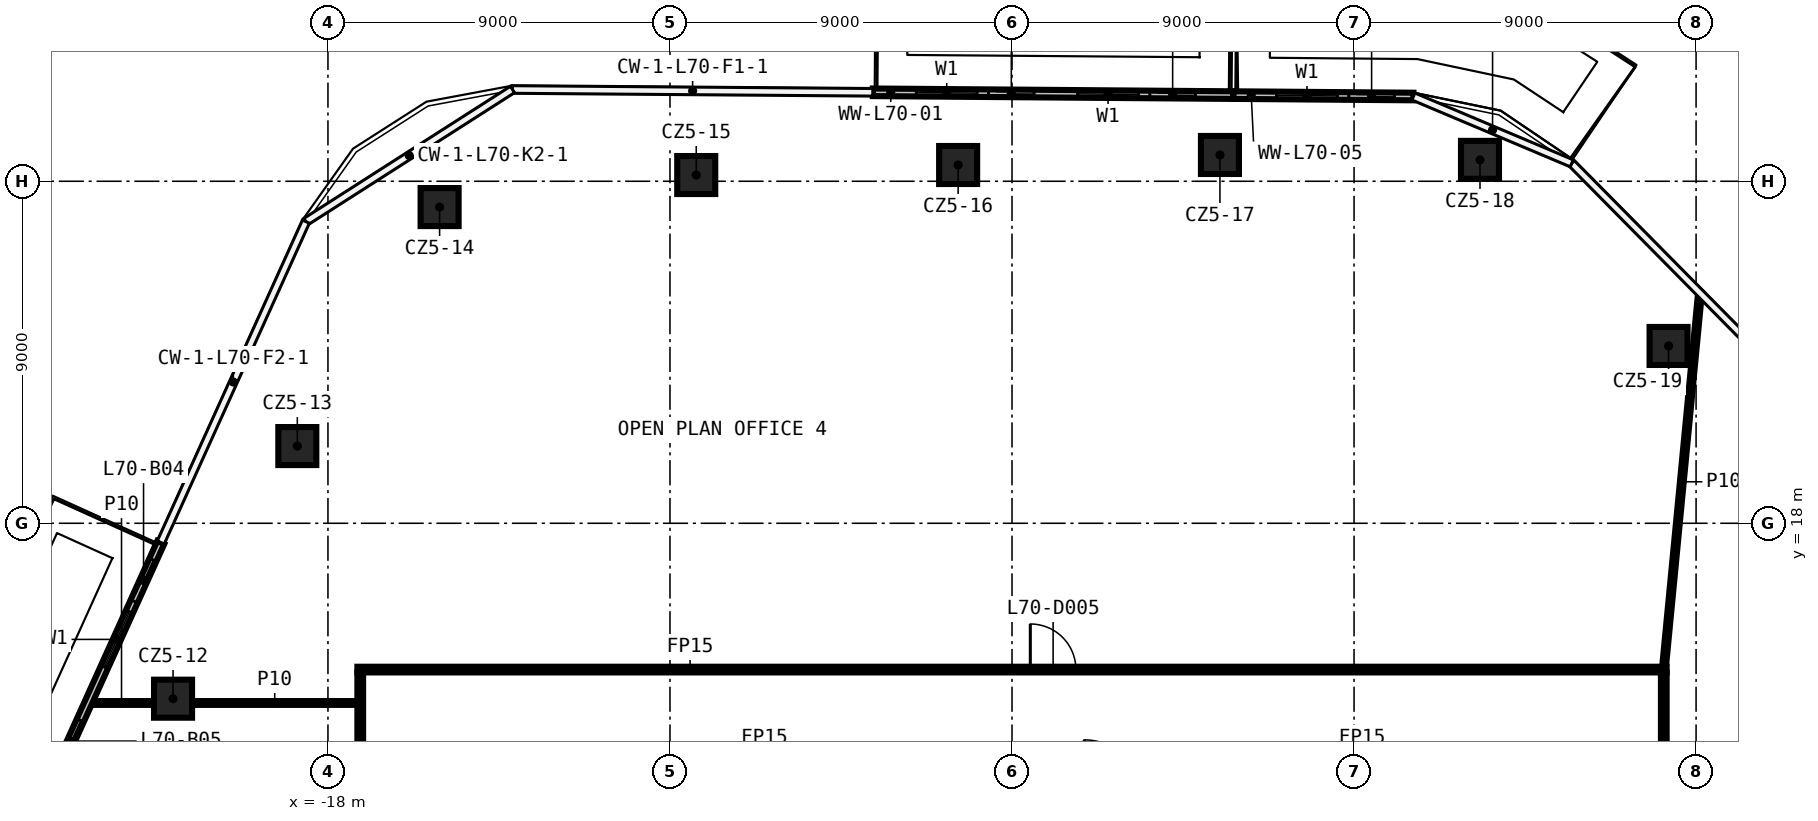
"""IFC4 building model, lengths in metres.
Left out: names, types, materials, properties, quantities, classifications, styles, units other than length and angle.
Written with IfcOpenShell. Run it as: python <this file> out.ifc"""

import sys

from ifc_helpers import new_model, si_unit, direction, frame, frame_2d, origin, origin_2d, place, context, subcontext, project, spatial, rectangle, extrude, element, fill, save


model = new_model("IFC4")
c1 = context("Model", 3, precision=1e-05, world=origin(), true_north=direction((0.0, 1.0)))
c2 = subcontext(c1, "Body", "Model", "MODEL_VIEW")
j1 = project(units=[si_unit("LENGTHUNIT", "METRE"), si_unit("PLANEANGLEUNIT", "RADIAN")], contexts=[c1])
p1 = place(None, origin())
s1 = spatial("IfcSite", under=j1, at=p1, CompositionType="ELEMENT")
p2 = place(p1, origin())
s2 = spatial("IfcBuilding", under=s1, at=p2, CompositionType="ELEMENT")
p3 = place(p2, frame((0.0, 0.0, 327.8)))
s3 = spatial("IfcBuildingStorey", under=s2, at=p3, CompositionType="ELEMENT", Elevation=327.8)
for number, where, z_axis, x_axis in (
    (1, (-22.076, 13.384, 0.0), (0.0, 0.0, 1.0), (1.0, 0.0, 0.0)),
    (2, (-18.806, 20.032, 0.0), (0.0, 0.0, 1.0), (1.0, 0.0, 0.0)),
    (3, (-15.062, 26.321, 0.0), (0.0, 0.0, 1.0), (1.0, 0.0, 0.0)),
    (4, (-8.309, 27.164, 0.0), (0.0, 0.0, 1.0), (1.0, 0.0, 0.0)),
    (5, (-1.418, 27.428, 0.0), (0.0, 0.0, 1.0), (1.0, 0.0, 0.0)),
    (6, (5.471, 27.692, 0.0), (0.0, 0.0, 1.0), (1.0, 0.0, 0.0)),
    (7, (12.314, 27.563, 0.0), (0.0, 0.0, 1.0), (1.0, 0.0, 0.0)),
    (8, (17.276, 22.666, 0.0), (0.0, 0.0, 1.0), (1.0, 0.0, 0.0)),
):
    element("IfcColumn", number, at=place(p3, frame(where, z_axis=z_axis, x_axis=x_axis)), inside=s3, PredefinedType="COLUMN", context=c2, shape_type="SweptSolid", body=[
        extrude(rectangle(XDim=1.0, YDim=1.0, at=origin_2d()), origin(), (0.0, 0.0, 1.0), 3.82),
    ])
p4 = place(p3, frame((-24.288, 13.271, 0.0), z_axis=(0.0, 0.0, 1.0), x_axis=(1.0, 0.0, 0.0)))
e9 = element("IfcWall", 9, at=p4, inside=s3, PredefinedType="PARTITIONING", context=c2, shape_type="SweptSolid", body=[
    extrude(rectangle(XDim=1.712, YDim=0.1, at=frame_2d((0.856, 0.0))), origin(), (0.0, 0.0, 1.0), 3.82),
])
p5 = place(p3, frame((-21.576, 13.271, 0.0), z_axis=(0.0, 0.0, 1.0), x_axis=(1.0, 0.0, 0.0)))
e10 = element("IfcWall", 10, at=p5, inside=s3, PredefinedType="PARTITIONING", context=c2, shape_type="SweptSolid", body=[
    extrude(rectangle(XDim=4.351, YDim=0.1, at=frame_2d((2.175, 0.0))), origin(), (0.0, 0.0, 1.0), 3.82),
])
p6 = place(p3, frame((-17.225, 14.15, 0.0), z_axis=(0.0, 0.0, 1.0), x_axis=(1.0, 0.0, 0.0)))
e11 = element("IfcWall", 11, at=p6, inside=s3, PredefinedType="PARTITIONING", context=c2, shape_type="SweptSolid", body=[
    extrude(rectangle(XDim=34.45, YDim=0.15, at=frame_2d((17.225, 0.0))), origin(), (0.0, 0.0, 1.0), 3.82),
])
p7 = place(p6, frame((17.706, 0.0, 0.0)))
e12 = element("IfcOpeningElement", 12, at=p7, cuts=e11, PredefinedType="OPENING", context=c2, shape_type="SweptSolid", body=[
    extrude(rectangle(XDim=1.2, YDim=2.1, at=frame_2d((0.6, 1.05))), frame((0.0, 0.085, 0.0), z_axis=(0.0, -1.0, 0.0), x_axis=(1.0, 0.0, 0.0)), (0.0, 0.0, 1.0), 0.17),
])
p8 = place(p3, frame((17.15, 14.15, 0.0), z_axis=(0.0, 0.0, 1.0), x_axis=(0.095686172631, 0.995411551253, 0.0)))
e13 = element("IfcWall", 13, at=p8, inside=s3, PredefinedType="PARTITIONING", context=c2, shape_type="SweptSolid", body=[
    extrude(rectangle(XDim=9.93, YDim=0.1, at=frame_2d((4.965, 0.0))), origin(), (0.0, 0.0, 1.0), 3.82),
])
p9 = place(p3, frame((17.15, 14.075, 0.0), z_axis=(0.0, 0.0, 1.0), x_axis=(0.0, -1.0, 0.0)))
e14 = element("IfcWall", 14, at=p9, inside=s3, PredefinedType="PARTITIONING", context=c2, shape_type="SweptSolid", body=[
    extrude(rectangle(XDim=28.15, YDim=0.15, at=frame_2d((14.075, 0.0))), origin(), (0.0, 0.0, 1.0), 3.82),
])
p10 = place(p9, frame((18.186, 0.0, 0.0)))
e15 = element("IfcOpeningElement", 15, at=p10, cuts=e14, PredefinedType="OPENING", context=c2, shape_type="SweptSolid", body=[
    extrude(rectangle(XDim=1.2, YDim=2.1, at=frame_2d((0.6, 1.05))), frame((0.0, 0.085, 0.0), z_axis=(0.0, -1.0, 0.0), x_axis=(1.0, 0.0, 0.0)), (0.0, 0.0, 1.0), 0.17),
])
p11 = place(p3, frame((-17.15, -14.075, 0.0), z_axis=(0.0, 0.0, 1.0), x_axis=(0.0, 1.0, 0.0)))
e16 = element("IfcWall", 16, at=p11, inside=s3, PredefinedType="PARTITIONING", context=c2, shape_type="SweptSolid", body=[
    extrude(rectangle(XDim=28.15, YDim=0.15, at=frame_2d((14.075, 0.0))), origin(), (0.0, 0.0, 1.0), 3.82),
])
p12 = place(p11, frame((18.298, 0.0, 0.0)))
e17 = element("IfcOpeningElement", 17, at=p12, cuts=e16, PredefinedType="OPENING", context=c2, shape_type="SweptSolid", body=[
    extrude(rectangle(XDim=1.2, YDim=2.1, at=frame_2d((0.6, 1.05))), frame((0.0, 0.085, 0.0), z_axis=(0.0, -1.0, 0.0), x_axis=(1.0, 0.0, 0.0)), (0.0, 0.0, 1.0), 0.17),
])
p13 = place(p3, frame((5.827, 29.267, 0.0), z_axis=(0.0, 0.0, 1.0), x_axis=(-0.999969823552, 0.007768653994, 0.0)))
e18 = element("IfcWall", 18, at=p13, inside=s3, PredefinedType="SOLIDWALL", context=c2, shape_type="SweptSolid", body=[
    extrude(rectangle(XDim=9.491, YDim=0.2, at=frame_2d((4.745, 0.0))), origin(), (0.0, 0.0, 1.0), 3.82),
])
p14 = place(p13, frame((2.5, 0.0, 0.6)))
e19 = element("IfcOpeningElement", 19, at=p14, cuts=e18, PredefinedType="OPENING", context=c2, shape_type="SweptSolid", body=[
    extrude(rectangle(XDim=1.6, YDim=2.4, at=frame_2d((0.8, 1.2))), frame((0.0, 0.11, 0.0), z_axis=(0.0, -1.0, 0.0), x_axis=(1.0, 0.0, 0.0)), (0.0, 0.0, 1.0), 0.22),
])
p15 = place(p13, frame((1.0, 0.0, 0.0)))
e20 = element("IfcOpeningElement", 20, at=p15, cuts=e18, PredefinedType="OPENING", context=c2, shape_type="SweptSolid", body=[
    extrude(rectangle(XDim=1.2, YDim=2.4, at=frame_2d((0.6, 1.2))), frame((0.0, 0.11, 0.0), z_axis=(0.0, -1.0, 0.0), x_axis=(1.0, 0.0, 0.0)), (0.0, 0.0, 1.0), 0.22),
])
p16 = place(p13, frame((6.745, 0.0, 0.6)))
e21 = element("IfcOpeningElement", 21, at=p16, cuts=e18, PredefinedType="OPENING", context=c2, shape_type="SweptSolid", body=[
    extrude(rectangle(XDim=1.6, YDim=2.4, at=frame_2d((0.8, 1.2))), frame((0.0, 0.11, 0.0), z_axis=(0.0, -1.0, 0.0), x_axis=(1.0, 0.0, 0.0)), (0.0, 0.0, 1.0), 0.22),
])
p17 = place(p13, frame((5.245, 0.0, 0.0)))
e22 = element("IfcOpeningElement", 22, at=p17, cuts=e18, PredefinedType="OPENING", context=c2, shape_type="SweptSolid", body=[
    extrude(rectangle(XDim=1.2, YDim=2.4, at=frame_2d((0.6, 1.2))), frame((0.0, 0.11, 0.0), z_axis=(0.0, -1.0, 0.0), x_axis=(1.0, 0.0, 0.0)), (0.0, 0.0, 1.0), 0.22),
])
p18 = place(p3, frame((10.562, 29.23, 0.0), z_axis=(0.0, 0.0, 1.0), x_axis=(-0.999969697406, 0.007784874423, 0.0)))
e23 = element("IfcWall", 23, at=p18, inside=s3, PredefinedType="SOLIDWALL", context=c2, shape_type="SweptSolid", body=[
    extrude(rectangle(XDim=4.736, YDim=0.2, at=frame_2d((2.368, 0.0))), origin(), (0.0, 0.0, 1.0), 3.82),
])
p19 = place(p18, frame((2.0, 0.0, 0.6)))
e24 = element("IfcOpeningElement", 24, at=p19, cuts=e23, PredefinedType="OPENING", context=c2, shape_type="SweptSolid", body=[
    extrude(rectangle(XDim=1.6, YDim=2.4, at=frame_2d((0.8, 1.2))), frame((0.0, 0.11, 0.0), z_axis=(0.0, -1.0, 0.0), x_axis=(1.0, 0.0, 0.0)), (0.0, 0.0, 1.0), 0.22),
])
p20 = place(p18, frame((0.5, 0.0, 0.0)))
e25 = element("IfcOpeningElement", 25, at=p20, cuts=e23, PredefinedType="OPENING", context=c2, shape_type="SweptSolid", body=[
    extrude(rectangle(XDim=1.2, YDim=2.4, at=frame_2d((0.6, 1.2))), frame((0.0, 0.11, 0.0), z_axis=(0.0, -1.0, 0.0), x_axis=(1.0, 0.0, 0.0)), (0.0, 0.0, 1.0), 0.22),
])
p21 = place(p3, frame((-22.399, 17.495, 0.0), z_axis=(0.0, 0.0, 1.0), x_axis=(-0.412123946496, -0.911127791654, 0.0)))
e26 = element("IfcWall", 26, at=p21, inside=s3, PredefinedType="SOLIDWALL", context=c2, shape_type="SweptSolid", body=[
    extrude(rectangle(XDim=23.18, YDim=0.2, at=frame_2d((11.59, 0.0))), origin(), (0.0, 0.0, 1.0), 3.82),
])
p22 = place(p21, frame((2.0, 0.0, 0.6)))
e27 = element("IfcOpeningElement", 27, at=p22, cuts=e26, PredefinedType="OPENING", context=c2, shape_type="SweptSolid", body=[
    extrude(rectangle(XDim=1.6, YDim=2.4, at=frame_2d((0.8, 1.2))), frame((0.0, 0.11, 0.0), z_axis=(0.0, -1.0, 0.0), x_axis=(1.0, 0.0, 0.0)), (0.0, 0.0, 1.0), 0.22),
])
p23 = place(p21, frame((0.5, 0.0, 0.0)))
e28 = element("IfcOpeningElement", 28, at=p23, cuts=e26, PredefinedType="OPENING", context=c2, shape_type="SweptSolid", body=[
    extrude(rectangle(XDim=1.2, YDim=2.4, at=frame_2d((0.6, 1.2))), frame((0.0, 0.11, 0.0), z_axis=(0.0, -1.0, 0.0), x_axis=(1.0, 0.0, 0.0)), (0.0, 0.0, 1.0), 0.22),
])
p24 = place(p21, frame((6.636, 0.0, 0.6)))
e29 = element("IfcOpeningElement", 29, at=p24, cuts=e26, PredefinedType="OPENING", context=c2, shape_type="SweptSolid", body=[
    extrude(rectangle(XDim=1.6, YDim=2.4, at=frame_2d((0.8, 1.2))), frame((0.0, 0.11, 0.0), z_axis=(0.0, -1.0, 0.0), x_axis=(1.0, 0.0, 0.0)), (0.0, 0.0, 1.0), 0.22),
])
p25 = place(p21, frame((5.136, 0.0, 0.0)))
e30 = element("IfcOpeningElement", 30, at=p25, cuts=e26, PredefinedType="OPENING", context=c2, shape_type="SweptSolid", body=[
    extrude(rectangle(XDim=1.2, YDim=2.4, at=frame_2d((0.6, 1.2))), frame((0.0, 0.11, 0.0), z_axis=(0.0, -1.0, 0.0), x_axis=(1.0, 0.0, 0.0)), (0.0, 0.0, 1.0), 0.22),
])
p26 = place(p21, frame((9.772, 0.0, 0.6)))
e31 = element("IfcOpeningElement", 31, at=p26, cuts=e26, PredefinedType="OPENING", context=c2, shape_type="SweptSolid", body=[
    extrude(rectangle(XDim=1.6, YDim=2.4, at=frame_2d((0.8, 1.2))), frame((0.0, 0.11, 0.0), z_axis=(0.0, -1.0, 0.0), x_axis=(1.0, 0.0, 0.0)), (0.0, 0.0, 1.0), 0.22),
])
p27 = place(p21, frame((11.672, 0.0, 0.0)))
e32 = element("IfcOpeningElement", 32, at=p27, cuts=e26, PredefinedType="OPENING", context=c2, shape_type="SweptSolid", body=[
    extrude(rectangle(XDim=1.2, YDim=2.4, at=frame_2d((0.6, 1.2))), frame((0.0, 0.11, 0.0), z_axis=(0.0, -1.0, 0.0), x_axis=(1.0, 0.0, 0.0)), (0.0, 0.0, 1.0), 0.22),
])
p28 = place(p21, frame((15.908, 0.0, 0.6)))
e33 = element("IfcOpeningElement", 33, at=p28, cuts=e26, PredefinedType="OPENING", context=c2, shape_type="SweptSolid", body=[
    extrude(rectangle(XDim=1.6, YDim=2.4, at=frame_2d((0.8, 1.2))), frame((0.0, 0.11, 0.0), z_axis=(0.0, -1.0, 0.0), x_axis=(1.0, 0.0, 0.0)), (0.0, 0.0, 1.0), 0.22),
])
p29 = place(p21, frame((14.408, 0.0, 0.0)))
e34 = element("IfcOpeningElement", 34, at=p29, cuts=e26, PredefinedType="OPENING", context=c2, shape_type="SweptSolid", body=[
    extrude(rectangle(XDim=1.2, YDim=2.4, at=frame_2d((0.6, 1.2))), frame((0.0, 0.11, 0.0), z_axis=(0.0, -1.0, 0.0), x_axis=(1.0, 0.0, 0.0)), (0.0, 0.0, 1.0), 0.22),
])
p30 = place(p21, frame((20.744, 0.0, 0.6)))
e35 = element("IfcOpeningElement", 35, at=p30, cuts=e26, PredefinedType="OPENING", context=c2, shape_type="SweptSolid", body=[
    extrude(rectangle(XDim=1.6, YDim=2.4, at=frame_2d((0.8, 1.2))), frame((0.0, 0.11, 0.0), z_axis=(0.0, -1.0, 0.0), x_axis=(1.0, 0.0, 0.0)), (0.0, 0.0, 1.0), 0.22),
])
p31 = place(p21, frame((19.244, 0.0, 0.0)))
e36 = element("IfcOpeningElement", 36, at=p31, cuts=e26, PredefinedType="OPENING", context=c2, shape_type="SweptSolid", body=[
    extrude(rectangle(XDim=1.2, YDim=2.4, at=frame_2d((0.6, 1.2))), frame((0.0, 0.11, 0.0), z_axis=(0.0, -1.0, 0.0), x_axis=(1.0, 0.0, 0.0)), (0.0, 0.0, 1.0), 0.22),
])
p32 = place(p7, origin())
e37 = element("IfcDoor", 37, at=p32, inside=s3, OperationType="SINGLE_SWING_RIGHT", PredefinedType="DOOR", context=c2, shape_type="SweptSolid", body=[
    extrude(rectangle(XDim=1.2, YDim=2.1, at=frame_2d((0.6, 1.05))), frame((0.0, 0.025, 0.0), z_axis=(0.0, -1.0, 0.0), x_axis=(1.0, 0.0, 0.0)), (0.0, 0.0, 1.0), 0.05),
])
fill(e12, e37)
p33 = place(p14, origin())
e38 = element("IfcWindow", 38, at=p33, inside=s3, PartitioningType="SINGLE_PANEL", PredefinedType="WINDOW", context=c2, shape_type="SweptSolid", body=[
    extrude(rectangle(XDim=1.6, YDim=2.4, at=frame_2d((0.8, 1.2))), frame((0.0, 0.03, 0.0), z_axis=(0.0, -1.0, 0.0), x_axis=(1.0, 0.0, 0.0)), (0.0, 0.0, 1.0), 0.06),
])
fill(e19, e38)
p34 = place(p15, origin())
e39 = element("IfcDoor", 39, at=p34, inside=s3, OperationType="SLIDING_TO_LEFT", PredefinedType="DOOR", context=c2, shape_type="SweptSolid", body=[
    extrude(rectangle(XDim=1.2, YDim=2.4, at=frame_2d((0.6, 1.2))), frame((0.0, 0.025, 0.0), z_axis=(0.0, -1.0, 0.0), x_axis=(1.0, 0.0, 0.0)), (0.0, 0.0, 1.0), 0.05),
])
fill(e20, e39)
p35 = place(p16, origin())
e40 = element("IfcWindow", 40, at=p35, inside=s3, PartitioningType="SINGLE_PANEL", PredefinedType="WINDOW", context=c2, shape_type="SweptSolid", body=[
    extrude(rectangle(XDim=1.6, YDim=2.4, at=frame_2d((0.8, 1.2))), frame((0.0, 0.03, 0.0), z_axis=(0.0, -1.0, 0.0), x_axis=(1.0, 0.0, 0.0)), (0.0, 0.0, 1.0), 0.06),
])
fill(e21, e40)
p36 = place(p17, origin())
e41 = element("IfcDoor", 41, at=p36, inside=s3, OperationType="SLIDING_TO_LEFT", PredefinedType="DOOR", context=c2, shape_type="SweptSolid", body=[
    extrude(rectangle(XDim=1.2, YDim=2.4, at=frame_2d((0.6, 1.2))), frame((0.0, 0.025, 0.0), z_axis=(0.0, -1.0, 0.0), x_axis=(1.0, 0.0, 0.0)), (0.0, 0.0, 1.0), 0.05),
])
fill(e22, e41)
p37 = place(p19, origin())
e42 = element("IfcWindow", 42, at=p37, inside=s3, PartitioningType="SINGLE_PANEL", PredefinedType="WINDOW", context=c2, shape_type="SweptSolid", body=[
    extrude(rectangle(XDim=1.6, YDim=2.4, at=frame_2d((0.8, 1.2))), frame((0.0, 0.03, 0.0), z_axis=(0.0, -1.0, 0.0), x_axis=(1.0, 0.0, 0.0)), (0.0, 0.0, 1.0), 0.06),
])
fill(e24, e42)
p38 = place(p20, origin())
e43 = element("IfcDoor", 43, at=p38, inside=s3, OperationType="SLIDING_TO_LEFT", PredefinedType="DOOR", context=c2, shape_type="SweptSolid", body=[
    extrude(rectangle(XDim=1.2, YDim=2.4, at=frame_2d((0.6, 1.2))), frame((0.0, 0.025, 0.0), z_axis=(0.0, -1.0, 0.0), x_axis=(1.0, 0.0, 0.0)), (0.0, 0.0, 1.0), 0.05),
])
fill(e25, e43)
p39 = place(p22, origin())
e44 = element("IfcWindow", 44, at=p39, inside=s3, PartitioningType="SINGLE_PANEL", PredefinedType="WINDOW", context=c2, shape_type="SweptSolid", body=[
    extrude(rectangle(XDim=1.6, YDim=2.4, at=frame_2d((0.8, 1.2))), frame((0.0, 0.03, 0.0), z_axis=(0.0, -1.0, 0.0), x_axis=(1.0, 0.0, 0.0)), (0.0, 0.0, 1.0), 0.06),
])
fill(e27, e44)
p40 = place(p23, origin())
e45 = element("IfcDoor", 45, at=p40, inside=s3, OperationType="SLIDING_TO_LEFT", PredefinedType="DOOR", context=c2, shape_type="SweptSolid", body=[
    extrude(rectangle(XDim=1.2, YDim=2.4, at=frame_2d((0.6, 1.2))), frame((0.0, 0.025, 0.0), z_axis=(0.0, -1.0, 0.0), x_axis=(1.0, 0.0, 0.0)), (0.0, 0.0, 1.0), 0.05),
])
fill(e28, e45)
p41 = place(p25, origin())
e46 = element("IfcDoor", 46, at=p41, inside=s3, OperationType="SLIDING_TO_LEFT", PredefinedType="DOOR", context=c2, shape_type="SweptSolid", body=[
    extrude(rectangle(XDim=1.2, YDim=2.4, at=frame_2d((0.6, 1.2))), frame((0.0, 0.025, 0.0), z_axis=(0.0, -1.0, 0.0), x_axis=(1.0, 0.0, 0.0)), (0.0, 0.0, 1.0), 0.05),
])
fill(e30, e46)
save(model, sys.argv[1])
